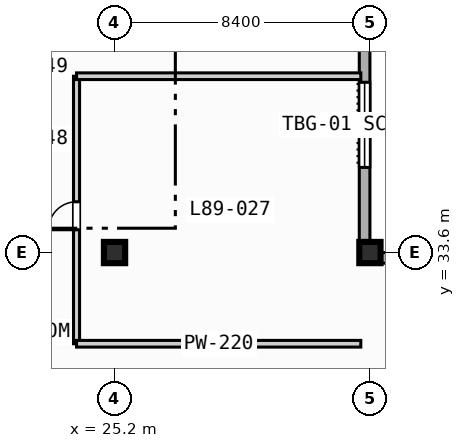
"""IFC4 building model, lengths in metres.
Left out: names, types, materials, properties, quantities, classifications, styles, units other than length and angle.
Written with IfcOpenShell. Run it as: python <this file> out.ifc"""

import sys

from ifc_helpers import new_model, si_unit, direction, frame, frame_2d, origin, origin_2d, place, context, subcontext, project, spatial, rectangle, extrude, element, fill, save


model = new_model("IFC4")
c1 = context("Model", 3, precision=1e-05, world=origin(), true_north=direction((0.0, 1.0)))
c2 = subcontext(c1, "Body", "Model", "MODEL_VIEW")
j1 = project(units=[si_unit("LENGTHUNIT", "METRE"), si_unit("PLANEANGLEUNIT", "RADIAN")], contexts=[c1])
p1 = place(None, origin())
s1 = spatial("IfcSite", under=j1, at=p1, CompositionType="ELEMENT")
p2 = place(p1, origin())
s2 = spatial("IfcBuilding", under=s1, at=p2, CompositionType="ELEMENT")
p3 = place(p2, frame((0.0, 0.0, 359.6)))
s3 = spatial("IfcBuildingStorey", under=s2, at=p3, CompositionType="ELEMENT", Elevation=359.6)
for number, where, z_axis, x_axis in (
    (1, (25.2, 33.6, 0.0), (0.0, 0.0, 1.0), (1.0, 0.0, 0.0)),
    (2, (33.6, 33.6, 0.0), (0.0, 0.0, 1.0), (1.0, 0.0, 0.0)),
):
    element("IfcColumn", number, at=place(p3, frame(where, z_axis=z_axis, x_axis=x_axis)), inside=s3, PredefinedType="COLUMN", context=c2, shape_type="SweptSolid", body=[
        extrude(rectangle(XDim=0.7, YDim=0.7, at=origin_2d()), origin(), (0.0, 0.0, 1.0), 4.2),
    ])
p4 = place(p3, frame((33.425, 72.425, 0.0), z_axis=(0.0, 0.0, 1.0), x_axis=(0.0, -1.0, 0.0)))
e3 = element("IfcWall", 3, at=p4, inside=s3, PredefinedType="STANDARD", context=c2, shape_type="SweptSolid", body=[
    extrude(rectangle(XDim=39.0, YDim=0.35, at=frame_2d((19.5, 0.0))), origin(), (0.0, 0.0, 1.0), 3.9),
])
p5 = place(p4, frame((33.225, 0.0, 0.85)))
e4 = element("IfcOpeningElement", 4, at=p5, cuts=e3, PredefinedType="OPENING", context=c2, shape_type="SweptSolid", body=[
    extrude(rectangle(XDim=2.8, YDim=2.1, at=frame_2d((1.4, 1.05))), frame((0.0, 0.185, 0.0), z_axis=(0.0, -1.0, 0.0), x_axis=(1.0, 0.0, 0.0)), (0.0, 0.0, 1.0), 0.37),
])
p6 = place(p4, frame((8.025, 0.0, 0.85)))
e5 = element("IfcOpeningElement", 5, at=p6, cuts=e3, PredefinedType="OPENING", context=c2, shape_type="SweptSolid", body=[
    extrude(rectangle(XDim=2.8, YDim=2.1, at=frame_2d((1.4, 1.05))), frame((0.0, 0.185, 0.0), z_axis=(0.0, -1.0, 0.0), x_axis=(1.0, 0.0, 0.0)), (0.0, 0.0, 1.0), 0.37),
])
p7 = place(p3, frame((33.425, 33.425, 0.0), z_axis=(0.0, 0.0, 1.0), x_axis=(1.0, 0.0, 0.0)))
e6 = element("IfcWall", 6, at=p7, inside=s3, PredefinedType="STANDARD", context=c2, shape_type="SweptSolid", body=[
    extrude(rectangle(XDim=30.6, YDim=0.35, at=frame_2d((15.3, 0.0))), origin(), (0.0, 0.0, 1.0), 3.045),
])
p8 = place(p7, frame((12.075, 0.0, 0.0)))
e7 = element("IfcOpeningElement", 7, at=p8, cuts=e6, PredefinedType="OPENING", context=c2, shape_type="SweptSolid", body=[
    extrude(rectangle(XDim=1.4, YDim=2.2, at=frame_2d((0.7, 1.1))), frame((0.0, 0.185, 0.0), z_axis=(0.0, -1.0, 0.0), x_axis=(1.0, 0.0, 0.0)), (0.0, 0.0, 1.0), 0.37),
])
p9 = place(p3, frame((23.95, 30.6, 0.0), z_axis=(0.0, 0.0, 1.0), x_axis=(0.0, 1.0, 0.0)))
e8 = element("IfcWall", 8, at=p9, inside=s3, PredefinedType="PARTITIONING", context=c2, shape_type="SweptSolid", body=[
    extrude(rectangle(XDim=8.8, YDim=0.2, at=frame_2d((4.4, 0.0))), origin(), (0.0, 0.0, 1.0), 3.9),
])
p10 = place(p9, frame((3.75, 0.0, 0.0)))
e9 = element("IfcOpeningElement", 9, at=p10, cuts=e8, PredefinedType="OPENING", context=c2, shape_type="SweptSolid", body=[
    extrude(rectangle(XDim=0.92, YDim=2.1, at=frame_2d((0.46, 1.05))), frame((0.0, 0.11, 0.0), z_axis=(0.0, -1.0, 0.0), x_axis=(1.0, 0.0, 0.0)), (0.0, 0.0, 1.0), 0.22),
])
for number, where, z_axis, x_axis in (
    (10, (23.95, 30.6, 0.0), (0.0, 0.0, 1.0), (1.0, 0.0, 0.0)),
    (11, (23.95, 39.4, 0.0), (0.0, 0.0, 1.0), (1.0, 0.0, 0.0)),
):
    element("IfcWall", number, at=place(p3, frame(where, z_axis=z_axis, x_axis=x_axis)), inside=s3, PredefinedType="PARTITIONING", context=c2, shape_type="SweptSolid", body=[
        extrude(rectangle(XDim=9.35, YDim=0.22, at=frame_2d((4.675, 0.0))), origin(), (0.0, 0.0, 1.0), 3.9),
    ])
p11 = place(p5, origin())
e12 = element("IfcWindow", 12, at=p11, inside=s3, PartitioningType="SINGLE_PANEL", PredefinedType="WINDOW", context=c2, shape_type="SweptSolid", body=[
    extrude(rectangle(XDim=2.8, YDim=2.1, at=frame_2d((1.4, 1.05))), frame((0.0, 0.03, 0.0), z_axis=(0.0, -1.0, 0.0), x_axis=(1.0, 0.0, 0.0)), (0.0, 0.0, 1.0), 0.06),
])
fill(e4, e12)
p12 = place(p10, origin())
e13 = element("IfcDoor", 13, at=p12, inside=s3, OperationType="SINGLE_SWING_LEFT", PredefinedType="DOOR", context=c2, shape_type="SweptSolid", body=[
    extrude(rectangle(XDim=0.92, YDim=2.1, at=frame_2d((0.46, 1.05))), frame((0.0, 0.025, 0.0), z_axis=(0.0, -1.0, 0.0), x_axis=(1.0, 0.0, 0.0)), (0.0, 0.0, 1.0), 0.05),
])
fill(e9, e13)
save(model, sys.argv[1])
